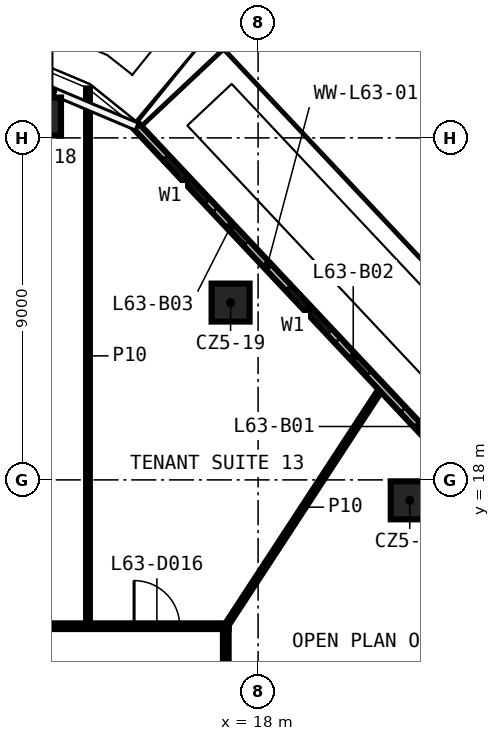
"""IFC4 building model, lengths in metres.
Left out: names, types, materials, properties, quantities, classifications, styles, units other than length and angle.
Written with IfcOpenShell. Run it as: python <this file> out.ifc"""

import sys

from ifc_helpers import new_model, si_unit, direction, frame, frame_2d, origin, origin_2d, place, context, subcontext, project, spatial, rectangle, extrude, element, fill, save


model = new_model("IFC4")
c1 = context("Model", 3, precision=1e-05, world=origin(), true_north=direction((0.0, 1.0)))
c2 = subcontext(c1, "Body", "Model", "MODEL_VIEW")
j1 = project(units=[si_unit("LENGTHUNIT", "METRE"), si_unit("PLANEANGLEUNIT", "RADIAN")], contexts=[c1])
p1 = place(None, origin())
s1 = spatial("IfcSite", under=j1, at=p1, CompositionType="ELEMENT")
p2 = place(p1, origin())
s2 = spatial("IfcBuilding", under=s1, at=p2, CompositionType="ELEMENT")
p3 = place(p2, frame((0.0, 0.0, 298.4)))
s3 = spatial("IfcBuildingStorey", under=s2, at=p3, CompositionType="ELEMENT", Elevation=298.4)
for number, where, z_axis, x_axis in (
    (1, (12.314, 27.563, 0.0), (0.0, 0.0, 1.0), (1.0, 0.0, 0.0)),
    (2, (17.276, 22.666, 0.0), (0.0, 0.0, 1.0), (1.0, 0.0, 0.0)),
    (3, (21.99, 17.462, 0.0), (0.0, 0.0, 1.0), (1.0, 0.0, 0.0)),
):
    element("IfcColumn", number, at=place(p3, frame(where, z_axis=z_axis, x_axis=x_axis)), inside=s3, PredefinedType="COLUMN", context=c2, shape_type="SweptSolid", body=[
        extrude(rectangle(XDim=1.0, YDim=1.0, at=origin_2d()), origin(), (0.0, 0.0, 1.0), 3.82),
    ])
p4 = place(p3, frame((-17.225, 14.15, 0.0), z_axis=(0.0, 0.0, 1.0), x_axis=(1.0, 0.0, 0.0)))
e4 = element("IfcWall", 4, at=p4, inside=s3, PredefinedType="PARTITIONING", context=c2, shape_type="SweptSolid", body=[
    extrude(rectangle(XDim=34.45, YDim=0.15, at=frame_2d((17.225, 0.0))), origin(), (0.0, 0.0, 1.0), 3.82),
])
p5 = place(p4, frame((31.962, 0.0, 0.0)))
e5 = element("IfcOpeningElement", 5, at=p5, cuts=e4, PredefinedType="OPENING", context=c2, shape_type="SweptSolid", body=[
    extrude(rectangle(XDim=1.2, YDim=2.1, at=frame_2d((0.6, 1.05))), frame((0.0, 0.085, 0.0), z_axis=(0.0, -1.0, 0.0), x_axis=(1.0, 0.0, 0.0)), (0.0, 0.0, 1.0), 0.17),
])
p6 = place(p4, frame((26.254, 0.0, 0.0)))
e6 = element("IfcOpeningElement", 6, at=p6, cuts=e4, PredefinedType="OPENING", context=c2, shape_type="SweptSolid", body=[
    extrude(rectangle(XDim=1.2, YDim=2.1, at=frame_2d((0.6, 1.05))), frame((0.0, 0.085, 0.0), z_axis=(0.0, -1.0, 0.0), x_axis=(1.0, 0.0, 0.0)), (0.0, 0.0, 1.0), 0.17),
])
p7 = place(p4, frame((20.032, 0.0, 0.0)))
e7 = element("IfcOpeningElement", 7, at=p7, cuts=e4, PredefinedType="OPENING", context=c2, shape_type="SweptSolid", body=[
    extrude(rectangle(XDim=1.2, YDim=2.1, at=frame_2d((0.6, 1.05))), frame((0.0, 0.085, 0.0), z_axis=(0.0, -1.0, 0.0), x_axis=(1.0, 0.0, 0.0)), (0.0, 0.0, 1.0), 0.17),
])
p8 = place(p4, frame((15.378, 0.0, 0.0)))
e8 = element("IfcOpeningElement", 8, at=p8, cuts=e4, PredefinedType="OPENING", context=c2, shape_type="SweptSolid", body=[
    extrude(rectangle(XDim=1.2, YDim=2.1, at=frame_2d((0.6, 1.05))), frame((0.0, 0.085, 0.0), z_axis=(0.0, -1.0, 0.0), x_axis=(1.0, 0.0, 0.0)), (0.0, 0.0, 1.0), 0.17),
])
p9 = place(p4, frame((10.723, 0.0, 0.0)))
e9 = element("IfcOpeningElement", 9, at=p9, cuts=e4, PredefinedType="OPENING", context=c2, shape_type="SweptSolid", body=[
    extrude(rectangle(XDim=1.2, YDim=2.1, at=frame_2d((0.6, 1.05))), frame((0.0, 0.085, 0.0), z_axis=(0.0, -1.0, 0.0), x_axis=(1.0, 0.0, 0.0)), (0.0, 0.0, 1.0), 0.17),
])
p10 = place(p4, frame((6.073, 0.0, 0.0)))
e10 = element("IfcOpeningElement", 10, at=p10, cuts=e4, PredefinedType="OPENING", context=c2, shape_type="SweptSolid", body=[
    extrude(rectangle(XDim=1.2, YDim=2.1, at=frame_2d((0.6, 1.05))), frame((0.0, 0.085, 0.0), z_axis=(0.0, -1.0, 0.0), x_axis=(1.0, 0.0, 0.0)), (0.0, 0.0, 1.0), 0.17),
])
p11 = place(p4, frame((1.774, 0.0, 0.0)))
e11 = element("IfcOpeningElement", 11, at=p11, cuts=e4, PredefinedType="OPENING", context=c2, shape_type="SweptSolid", body=[
    extrude(rectangle(XDim=1.2, YDim=2.1, at=frame_2d((0.6, 1.05))), frame((0.0, 0.085, 0.0), z_axis=(0.0, -1.0, 0.0), x_axis=(1.0, 0.0, 0.0)), (0.0, 0.0, 1.0), 0.17),
])
p12 = place(p3, frame((17.15, 14.15, 0.0), z_axis=(0.0, 0.0, 1.0), x_axis=(0.547120172247, 0.837054070608, 0.0)))
e12 = element("IfcWall", 12, at=p12, inside=s3, PredefinedType="PARTITIONING", context=c2, shape_type="SweptSolid", body=[
    extrude(rectangle(XDim=7.485, YDim=0.1, at=frame_2d((3.743, 0.0))), origin(), (0.0, 0.0, 1.0), 3.82),
])
p13 = place(p3, frame((17.15, 14.075, 0.0), z_axis=(0.0, 0.0, 1.0), x_axis=(0.0, -1.0, 0.0)))
e13 = element("IfcWall", 13, at=p13, inside=s3, PredefinedType="PARTITIONING", context=c2, shape_type="SweptSolid", body=[
    extrude(rectangle(XDim=28.15, YDim=0.15, at=frame_2d((14.075, 0.0))), origin(), (0.0, 0.0, 1.0), 3.82),
])
p14 = place(p13, frame((24.326, 0.0, 0.0)))
e14 = element("IfcOpeningElement", 14, at=p14, cuts=e13, PredefinedType="OPENING", context=c2, shape_type="SweptSolid", body=[
    extrude(rectangle(XDim=1.2, YDim=2.1, at=frame_2d((0.6, 1.05))), frame((0.0, 0.085, 0.0), z_axis=(0.0, -1.0, 0.0), x_axis=(1.0, 0.0, 0.0)), (0.0, 0.0, 1.0), 0.17),
])
p15 = place(p13, frame((20.22, 0.0, 0.0)))
e15 = element("IfcOpeningElement", 15, at=p15, cuts=e13, PredefinedType="OPENING", context=c2, shape_type="SweptSolid", body=[
    extrude(rectangle(XDim=1.2, YDim=2.1, at=frame_2d((0.6, 1.05))), frame((0.0, 0.085, 0.0), z_axis=(0.0, -1.0, 0.0), x_axis=(1.0, 0.0, 0.0)), (0.0, 0.0, 1.0), 0.17),
])
p16 = place(p13, frame((16.114, 0.0, 0.0)))
e16 = element("IfcOpeningElement", 16, at=p16, cuts=e13, PredefinedType="OPENING", context=c2, shape_type="SweptSolid", body=[
    extrude(rectangle(XDim=1.2, YDim=2.1, at=frame_2d((0.6, 1.05))), frame((0.0, 0.085, 0.0), z_axis=(0.0, -1.0, 0.0), x_axis=(1.0, 0.0, 0.0)), (0.0, 0.0, 1.0), 0.17),
])
p17 = place(p13, frame((12.012, 0.0, 0.0)))
e17 = element("IfcOpeningElement", 17, at=p17, cuts=e13, PredefinedType="OPENING", context=c2, shape_type="SweptSolid", body=[
    extrude(rectangle(XDim=1.2, YDim=2.1, at=frame_2d((0.6, 1.05))), frame((0.0, 0.085, 0.0), z_axis=(0.0, -1.0, 0.0), x_axis=(1.0, 0.0, 0.0)), (0.0, 0.0, 1.0), 0.17),
])
p18 = place(p13, frame((5.504, 0.0, 0.0)))
e18 = element("IfcOpeningElement", 18, at=p18, cuts=e13, PredefinedType="OPENING", context=c2, shape_type="SweptSolid", body=[
    extrude(rectangle(XDim=1.2, YDim=2.1, at=frame_2d((0.6, 1.05))), frame((0.0, 0.085, 0.0), z_axis=(0.0, -1.0, 0.0), x_axis=(1.0, 0.0, 0.0)), (0.0, 0.0, 1.0), 0.17),
])
p19 = place(p13, frame((1.622, 0.0, 0.0)))
e19 = element("IfcOpeningElement", 19, at=p19, cuts=e13, PredefinedType="OPENING", context=c2, shape_type="SweptSolid", body=[
    extrude(rectangle(XDim=1.2, YDim=2.1, at=frame_2d((0.6, 1.05))), frame((0.0, 0.085, 0.0), z_axis=(0.0, -1.0, 0.0), x_axis=(1.0, 0.0, 0.0)), (0.0, 0.0, 1.0), 0.17),
])
p20 = place(p3, frame((13.524, 14.225, 0.0), z_axis=(0.0, 0.0, 1.0), x_axis=(0.0, 1.0, 0.0)))
e20 = element("IfcWall", 20, at=p20, inside=s3, PredefinedType="PARTITIONING", context=c2, shape_type="SweptSolid", body=[
    extrude(rectangle(XDim=14.077, YDim=0.1, at=frame_2d((7.039, 0.0))), origin(), (0.0, 0.0, 1.0), 3.82),
])
p21 = place(p3, frame((24.482, 17.0, 0.0), z_axis=(0.0, 0.0, 1.0), x_axis=(-0.684823965592, 0.728708539919, 0.0)))
e21 = element("IfcWall", 21, at=p21, inside=s3, PredefinedType="SOLIDWALL", context=c2, shape_type="SweptSolid", body=[
    extrude(rectangle(XDim=14.131, YDim=0.2, at=frame_2d((7.065, 0.0))), origin(), (0.0, 0.0, 1.0), 3.82),
])
p22 = place(p21, frame((0.5, 0.0, 0.6)))
e22 = element("IfcOpeningElement", 22, at=p22, cuts=e21, PredefinedType="OPENING", context=c2, shape_type="SweptSolid", body=[
    extrude(rectangle(XDim=1.6, YDim=2.4, at=frame_2d((0.8, 1.2))), frame((0.0, 0.11, 0.0), z_axis=(0.0, -1.0, 0.0), x_axis=(1.0, 0.0, 0.0)), (0.0, 0.0, 1.0), 0.22),
])
p23 = place(p21, frame((2.7, 0.0, 0.0)))
e23 = element("IfcOpeningElement", 23, at=p23, cuts=e21, PredefinedType="OPENING", context=c2, shape_type="SweptSolid", body=[
    extrude(rectangle(XDim=1.2, YDim=2.4, at=frame_2d((0.6, 1.2))), frame((0.0, 0.11, 0.0), z_axis=(0.0, -1.0, 0.0), x_axis=(1.0, 0.0, 0.0)), (0.0, 0.0, 1.0), 0.22),
])
p24 = place(p21, frame((6.71, 0.0, 0.6)))
e24 = element("IfcOpeningElement", 24, at=p24, cuts=e21, PredefinedType="OPENING", context=c2, shape_type="SweptSolid", body=[
    extrude(rectangle(XDim=1.6, YDim=2.4, at=frame_2d((0.8, 1.2))), frame((0.0, 0.11, 0.0), z_axis=(0.0, -1.0, 0.0), x_axis=(1.0, 0.0, 0.0)), (0.0, 0.0, 1.0), 0.22),
])
p25 = place(p21, frame((5.21, 0.0, 0.0)))
e25 = element("IfcOpeningElement", 25, at=p25, cuts=e21, PredefinedType="OPENING", context=c2, shape_type="SweptSolid", body=[
    extrude(rectangle(XDim=1.2, YDim=2.4, at=frame_2d((0.6, 1.2))), frame((0.0, 0.11, 0.0), z_axis=(0.0, -1.0, 0.0), x_axis=(1.0, 0.0, 0.0)), (0.0, 0.0, 1.0), 0.22),
])
p26 = place(p21, frame((11.42, 0.0, 0.6)))
e26 = element("IfcOpeningElement", 26, at=p26, cuts=e21, PredefinedType="OPENING", context=c2, shape_type="SweptSolid", body=[
    extrude(rectangle(XDim=1.6, YDim=2.4, at=frame_2d((0.8, 1.2))), frame((0.0, 0.11, 0.0), z_axis=(0.0, -1.0, 0.0), x_axis=(1.0, 0.0, 0.0)), (0.0, 0.0, 1.0), 0.22),
])
p27 = place(p21, frame((9.92, 0.0, 0.0)))
e27 = element("IfcOpeningElement", 27, at=p27, cuts=e21, PredefinedType="OPENING", context=c2, shape_type="SweptSolid", body=[
    extrude(rectangle(XDim=1.2, YDim=2.4, at=frame_2d((0.6, 1.2))), frame((0.0, 0.11, 0.0), z_axis=(0.0, -1.0, 0.0), x_axis=(1.0, 0.0, 0.0)), (0.0, 0.0, 1.0), 0.22),
])
p28 = place(p5, origin())
e28 = element("IfcDoor", 28, at=p28, inside=s3, OperationType="SINGLE_SWING_LEFT", PredefinedType="DOOR", context=c2, shape_type="SweptSolid", body=[
    extrude(rectangle(XDim=1.2, YDim=2.1, at=frame_2d((0.6, 1.05))), frame((0.0, 0.025, 0.0), z_axis=(0.0, -1.0, 0.0), x_axis=(1.0, 0.0, 0.0)), (0.0, 0.0, 1.0), 0.05),
])
fill(e5, e28)
p29 = place(p23, origin())
e29 = element("IfcDoor", 29, at=p29, inside=s3, OperationType="SLIDING_TO_LEFT", PredefinedType="DOOR", context=c2, shape_type="SweptSolid", body=[
    extrude(rectangle(XDim=1.2, YDim=2.4, at=frame_2d((0.6, 1.2))), frame((0.0, 0.025, 0.0), z_axis=(0.0, -1.0, 0.0), x_axis=(1.0, 0.0, 0.0)), (0.0, 0.0, 1.0), 0.05),
])
fill(e23, e29)
p30 = place(p24, origin())
e30 = element("IfcWindow", 30, at=p30, inside=s3, PartitioningType="SINGLE_PANEL", PredefinedType="WINDOW", context=c2, shape_type="SweptSolid", body=[
    extrude(rectangle(XDim=1.6, YDim=2.4, at=frame_2d((0.8, 1.2))), frame((0.0, 0.03, 0.0), z_axis=(0.0, -1.0, 0.0), x_axis=(1.0, 0.0, 0.0)), (0.0, 0.0, 1.0), 0.06),
])
fill(e24, e30)
p31 = place(p25, origin())
e31 = element("IfcDoor", 31, at=p31, inside=s3, OperationType="SLIDING_TO_LEFT", PredefinedType="DOOR", context=c2, shape_type="SweptSolid", body=[
    extrude(rectangle(XDim=1.2, YDim=2.4, at=frame_2d((0.6, 1.2))), frame((0.0, 0.025, 0.0), z_axis=(0.0, -1.0, 0.0), x_axis=(1.0, 0.0, 0.0)), (0.0, 0.0, 1.0), 0.05),
])
fill(e25, e31)
p32 = place(p26, origin())
e32 = element("IfcWindow", 32, at=p32, inside=s3, PartitioningType="SINGLE_PANEL", PredefinedType="WINDOW", context=c2, shape_type="SweptSolid", body=[
    extrude(rectangle(XDim=1.6, YDim=2.4, at=frame_2d((0.8, 1.2))), frame((0.0, 0.03, 0.0), z_axis=(0.0, -1.0, 0.0), x_axis=(1.0, 0.0, 0.0)), (0.0, 0.0, 1.0), 0.06),
])
fill(e26, e32)
p33 = place(p27, origin())
e33 = element("IfcDoor", 33, at=p33, inside=s3, OperationType="SLIDING_TO_LEFT", PredefinedType="DOOR", context=c2, shape_type="SweptSolid", body=[
    extrude(rectangle(XDim=1.2, YDim=2.4, at=frame_2d((0.6, 1.2))), frame((0.0, 0.025, 0.0), z_axis=(0.0, -1.0, 0.0), x_axis=(1.0, 0.0, 0.0)), (0.0, 0.0, 1.0), 0.05),
])
fill(e27, e33)
save(model, sys.argv[1])
